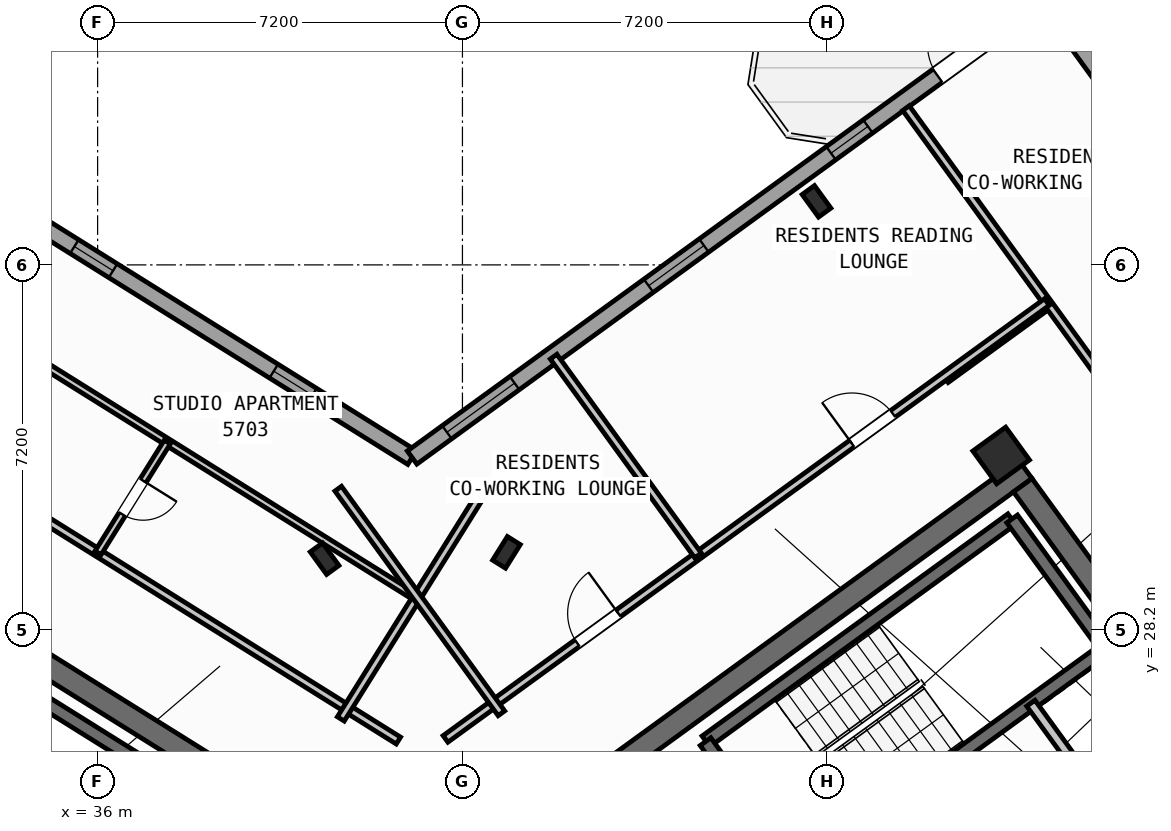
"""IFC4 building model, lengths in metres.
Left out: names, types, materials, properties, quantities, classifications, styles, units other than length and angle.
Written with IfcOpenShell. Run it as: python <this file> out.ifc"""

import sys

from ifc_helpers import new_model, si_unit, direction, frame, frame_2d, origin, origin_2d, place, context, subcontext, project, spatial, rectangle, hollow_rectangle, i_section, extrude, source, transform, mapped, element, fill, save


model = new_model("IFC4")
c1 = context("Model", 3, precision=1e-05, world=origin(), true_north=direction((0.0, 1.0)))
c2 = subcontext(c1, "Body", "Model", "MODEL_VIEW")
j1 = project(units=[si_unit("LENGTHUNIT", "METRE"), si_unit("PLANEANGLEUNIT", "RADIAN")], contexts=[c1])
p1 = place(None, origin())
s1 = spatial("IfcSite", under=j1, at=p1, CompositionType="ELEMENT")
p2 = place(p1, origin())
s2 = spatial("IfcBuilding", under=s1, at=p2, CompositionType="ELEMENT")
p3 = place(p2, frame((0.0, 0.0, 225.6)))
s3 = spatial("IfcBuildingStorey", under=s2, at=p3, CompositionType="ELEMENT", Elevation=225.6)
p4 = place(p3, frame((40.531, 24.036, 0.0), z_axis=(0.0, 0.0, 1.0), x_axis=(-0.848048787466, 0.529918157905, 0.0)))
e1 = element("IfcWall", 1, at=p4, inside=s3, PredefinedType="SHEAR", context=c2, shape_type="SweptSolid", body=[
    extrude(rectangle(XDim=13.04, YDim=0.45, at=frame_2d((6.52, 0.0))), origin(), (0.0, 0.0, 1.0), 3.35),
])
p5 = place(p3, frame((44.406, 24.172, 0.0), z_axis=(0.0, 0.0, 1.0), x_axis=(0.809012867805, 0.587790931986, 0.0)))
e2 = element("IfcWall", 2, at=p5, inside=s3, PredefinedType="SHEAR", context=c2, shape_type="SweptSolid", body=[
    extrude(rectangle(XDim=12.24, YDim=0.45, at=frame_2d((6.12, 0.0))), origin(), (0.0, 0.0, 1.0), 3.35),
])
p6 = place(p3, frame((58.064, 25.813, 0.0), z_axis=(0.0, 0.0, 1.0), x_axis=(-0.587774812919, 0.809024578921, 0.0)))
e3 = element("IfcWall", 3, at=p6, inside=s3, PredefinedType="SHEAR", context=c2, shape_type="SweptSolid", body=[
    extrude(rectangle(XDim=6.475, YDim=0.45, at=frame_2d((3.238, 0.0))), origin(), (0.0, 0.0, 1.0), 3.35),
])
m1 = source(origin(), c2, "Body", "SweptSolid", [
    extrude(i_section(OverallWidth=0.3, OverallDepth=0.55, WebThickness=0.015, FlangeThickness=0.029, at=origin_2d()), origin(), (0.0, 0.0, 1.0), 3.6),
])
for number, where, z_axis, x_axis in (
    (4, (44.068, 29.726, 0.0), (0.0, 0.0, 1.0), (-0.848, 0.53, 0.0)),
    (5, (40.479, 29.601, 0.0), (0.0, 0.0, 1.0), (0.809, 0.588, 0.0)),
):
    element("IfcColumn", number, at=place(p3, frame(where, z_axis=z_axis, x_axis=x_axis)), inside=s3, PredefinedType="COLUMN", context=c2, shape_type="MappedRepresentation", body=[
        mapped(m1, transform((0.0, 0.0, 0.0), scale=1.0)),
    ])
m2 = source(origin(), c2, "Body", "SweptSolid", [
    extrude(hollow_rectangle(XDim=0.8, YDim=0.8, WallThickness=0.032, at=origin_2d()), origin(), (0.0, 0.0, 1.0), 3.6),
])
p7 = place(p3, frame((53.832, 31.638, 0.0), z_axis=(0.0, 0.0, 1.0), x_axis=(0.809016994375, 0.587785252292, 0.0)))
e6 = element("IfcColumn", 6, at=p7, inside=s3, PredefinedType="COLUMN", context=c2, shape_type="MappedRepresentation", body=[
    mapped(m2, transform((0.0, 0.0, 0.0), scale=1.0)),
])
p8 = place(p3, frame((50.188, 36.654, 0.0), z_axis=(0.0, 0.0, 1.0), x_axis=(0.809016994375, 0.587785252292, 0.0)))
e7 = element("IfcColumn", 7, at=p8, inside=s3, PredefinedType="COLUMN", context=c2, shape_type="MappedRepresentation", body=[
    mapped(m1, transform((0.0, 0.0, 0.0), scale=1.0)),
])
p9 = place(p3, frame((17.424, 47.083, 0.0), z_axis=(0.0, 0.0, 1.0), x_axis=(0.848049927979, -0.529916332693, 0.0)))
e8 = element("IfcWall", 8, at=p9, inside=s3, PredefinedType="STANDARD", context=c2, shape_type="SweptSolid", body=[
    extrude(rectangle(XDim=29.223, YDim=0.32, at=frame_2d((14.612, 0.0))), origin(), (0.0, 0.0, 1.0), 3.35),
])
p10 = place(p9, frame((3.709, 0.0, 0.0)))
e9 = element("IfcOpeningElement", 9, at=p10, cuts=e8, PredefinedType="OPENING", context=c2, shape_type="SweptSolid", body=[
    extrude(rectangle(XDim=1.05, YDim=2.15, at=frame_2d((0.525, 1.075))), frame((0.0, 0.17, 0.0), z_axis=(0.0, -1.0, 0.0), x_axis=(1.0, 0.0, 0.0)), (0.0, 0.0, 1.0), 0.34),
])
p11 = place(p9, frame((0.809, 0.0, 1.0)))
e10 = element("IfcOpeningElement", 10, at=p11, cuts=e8, PredefinedType="OPENING", context=c2, shape_type="SweptSolid", body=[
    extrude(rectangle(XDim=0.9, YDim=1.25, at=frame_2d((0.45, 0.625))), frame((0.0, 0.17, 0.0), z_axis=(0.0, -1.0, 0.0), x_axis=(1.0, 0.0, 0.0)), (0.0, 0.0, 1.0), 0.34),
])
p12 = place(p9, frame((13.811, 0.0, 0.9)))
e11 = element("IfcOpeningElement", 11, at=p12, cuts=e8, PredefinedType="OPENING", context=c2, shape_type="SweptSolid", body=[
    extrude(rectangle(XDim=1.35, YDim=1.45, at=frame_2d((0.675, 0.725))), frame((0.0, 0.17, 0.0), z_axis=(0.0, -1.0, 0.0), x_axis=(1.0, 0.0, 0.0)), (0.0, 0.0, 1.0), 0.34),
])
p13 = place(p9, frame((17.254, 0.0, 1.0)))
e12 = element("IfcOpeningElement", 12, at=p13, cuts=e8, PredefinedType="OPENING", context=c2, shape_type="SweptSolid", body=[
    extrude(rectangle(XDim=0.9, YDim=1.25, at=frame_2d((0.45, 0.625))), frame((0.0, 0.17, 0.0), z_axis=(0.0, -1.0, 0.0), x_axis=(1.0, 0.0, 0.0)), (0.0, 0.0, 1.0), 0.34),
])
p14 = place(p9, frame((21.364, 0.0, 1.0)))
e13 = element("IfcOpeningElement", 13, at=p14, cuts=e8, PredefinedType="OPENING", context=c2, shape_type="SweptSolid", body=[
    extrude(rectangle(XDim=0.9, YDim=1.25, at=frame_2d((0.45, 0.625))), frame((0.0, 0.17, 0.0), z_axis=(0.0, -1.0, 0.0), x_axis=(1.0, 0.0, 0.0)), (0.0, 0.0, 1.0), 0.34),
])
p15 = place(p9, frame((26.003, 0.0, 1.0)))
e14 = element("IfcOpeningElement", 14, at=p15, cuts=e8, PredefinedType="OPENING", context=c2, shape_type="SweptSolid", body=[
    extrude(rectangle(XDim=0.9, YDim=1.25, at=frame_2d((0.45, 0.625))), frame((0.0, 0.17, 0.0), z_axis=(0.0, -1.0, 0.0), x_axis=(1.0, 0.0, 0.0)), (0.0, 0.0, 1.0), 0.34),
])
p16 = place(p9, frame((11.211, 0.0, 1.0)))
e15 = element("IfcOpeningElement", 15, at=p16, cuts=e8, PredefinedType="OPENING", context=c2, shape_type="SweptSolid", body=[
    extrude(rectangle(XDim=0.65, YDim=1.15, at=frame_2d((0.325, 0.575))), frame((0.0, 0.17, 0.0), z_axis=(0.0, -1.0, 0.0), x_axis=(1.0, 0.0, 0.0)), (0.0, 0.0, 1.0), 0.34),
])
p17 = place(p9, frame((9.079, 0.0, 1.0)))
e16 = element("IfcOpeningElement", 16, at=p17, cuts=e8, PredefinedType="OPENING", context=c2, shape_type="SweptSolid", body=[
    extrude(rectangle(XDim=0.65, YDim=1.15, at=frame_2d((0.325, 0.575))), frame((0.0, 0.17, 0.0), z_axis=(0.0, -1.0, 0.0), x_axis=(1.0, 0.0, 0.0)), (0.0, 0.0, 1.0), 0.34),
])
p18 = place(p9, frame((6.951, 0.0, 1.0)))
e17 = element("IfcOpeningElement", 17, at=p18, cuts=e8, PredefinedType="OPENING", context=c2, shape_type="SweptSolid", body=[
    extrude(rectangle(XDim=0.65, YDim=1.15, at=frame_2d((0.325, 0.575))), frame((0.0, 0.17, 0.0), z_axis=(0.0, -1.0, 0.0), x_axis=(1.0, 0.0, 0.0)), (0.0, 0.0, 1.0), 0.34),
])
p19 = place(p3, frame((42.207, 31.597, 0.0), z_axis=(0.0, 0.0, 1.0), x_axis=(0.809020333377, 0.587780656523, 0.0)))
e18 = element("IfcWall", 18, at=p19, inside=s3, PredefinedType="STANDARD", context=c2, shape_type="SweptSolid", body=[
    extrude(rectangle(XDim=15.223, YDim=0.32, at=frame_2d((7.611, 0.0))), origin(), (0.0, 0.0, 1.0), 3.35),
])
p20 = place(p19, frame((12.82, 0.0, 0.0)))
e19 = element("IfcOpeningElement", 19, at=p20, cuts=e18, PredefinedType="OPENING", context=c2, shape_type="SweptSolid", body=[
    extrude(rectangle(XDim=1.05, YDim=2.15, at=frame_2d((0.525, 1.075))), frame((0.0, 0.17, 0.0), z_axis=(0.0, -1.0, 0.0), x_axis=(1.0, 0.0, 0.0)), (0.0, 0.0, 1.0), 0.34),
])
p21 = place(p19, frame((0.85, 0.0, 0.9)))
e20 = element("IfcOpeningElement", 20, at=p21, cuts=e18, PredefinedType="OPENING", context=c2, shape_type="SweptSolid", body=[
    extrude(rectangle(XDim=1.65, YDim=1.45, at=frame_2d((0.825, 0.725))), frame((0.0, 0.17, 0.0), z_axis=(0.0, -1.0, 0.0), x_axis=(1.0, 0.0, 0.0)), (0.0, 0.0, 1.0), 0.34),
])
p22 = place(p19, frame((5.769, 0.0, 0.9)))
e21 = element("IfcOpeningElement", 21, at=p22, cuts=e18, PredefinedType="OPENING", context=c2, shape_type="SweptSolid", body=[
    extrude(rectangle(XDim=1.35, YDim=1.45, at=frame_2d((0.675, 0.725))), frame((0.0, 0.17, 0.0), z_axis=(0.0, -1.0, 0.0), x_axis=(1.0, 0.0, 0.0)), (0.0, 0.0, 1.0), 0.34),
])
p23 = place(p19, frame((10.219, 0.0, 1.0)))
e22 = element("IfcOpeningElement", 22, at=p23, cuts=e18, PredefinedType="OPENING", context=c2, shape_type="SweptSolid", body=[
    extrude(rectangle(XDim=0.9, YDim=1.25, at=frame_2d((0.45, 0.625))), frame((0.0, 0.17, 0.0), z_axis=(0.0, -1.0, 0.0), x_axis=(1.0, 0.0, 0.0)), (0.0, 0.0, 1.0), 0.34),
])
p24 = place(p3, frame((54.81, 40.5, 0.0), z_axis=(0.0, 0.0, 1.0), x_axis=(0.587783625747, -0.809018176127, 0.0)))
e23 = element("IfcWall", 23, at=p24, inside=s3, PredefinedType="STANDARD", context=c2, shape_type="SweptSolid", body=[
    extrude(rectangle(XDim=21.587, YDim=0.32, at=frame_2d((10.794, 0.0))), origin(), (0.0, 0.0, 1.0), 2.825),
])
p25 = place(p24, frame((2.593, 0.0, 0.9)))
e24 = element("IfcOpeningElement", 24, at=p25, cuts=e23, PredefinedType="OPENING", context=c2, shape_type="SweptSolid", body=[
    extrude(rectangle(XDim=1.65, YDim=1.45, at=frame_2d((0.825, 0.725))), frame((0.0, 0.17, 0.0), z_axis=(0.0, -1.0, 0.0), x_axis=(1.0, 0.0, 0.0)), (0.0, 0.0, 1.0), 0.34),
])
p26 = place(p24, frame((8.119, 0.0, 0.9)))
e25 = element("IfcOpeningElement", 25, at=p26, cuts=e23, PredefinedType="OPENING", context=c2, shape_type="SweptSolid", body=[
    extrude(rectangle(XDim=1.35, YDim=1.45, at=frame_2d((0.675, 0.725))), frame((0.0, 0.17, 0.0), z_axis=(0.0, -1.0, 0.0), x_axis=(1.0, 0.0, 0.0)), (0.0, 0.0, 1.0), 0.34),
])
p27 = place(p24, frame((11.019, 0.0, 0.9)))
e26 = element("IfcOpeningElement", 26, at=p27, cuts=e23, PredefinedType="OPENING", context=c2, shape_type="SweptSolid", body=[
    extrude(rectangle(XDim=1.35, YDim=1.45, at=frame_2d((0.675, 0.725))), frame((0.0, 0.17, 0.0), z_axis=(0.0, -1.0, 0.0), x_axis=(1.0, 0.0, 0.0)), (0.0, 0.0, 1.0), 0.34),
])
p28 = place(p24, frame((19.259, 0.0, 1.0)))
e27 = element("IfcOpeningElement", 27, at=p28, cuts=e23, PredefinedType="OPENING", context=c2, shape_type="SweptSolid", body=[
    extrude(rectangle(XDim=0.9, YDim=1.25, at=frame_2d((0.45, 0.625))), frame((0.0, 0.17, 0.0), z_axis=(0.0, -1.0, 0.0), x_axis=(1.0, 0.0, 0.0)), (0.0, 0.0, 1.0), 0.34),
])
p29 = place(p3, frame((39.721, 23.788, 0.0), z_axis=(0.0, 0.0, 1.0), x_axis=(-0.848054434086, 0.529909121291, 0.0)))
e28 = element("IfcWall", 28, at=p29, inside=s3, PredefinedType="SHEAR", context=c2, shape_type="SweptSolid", body=[
    extrude(rectangle(XDim=7.33, YDim=0.26, at=frame_2d((3.665, 0.0))), origin(), (0.0, 0.0, 1.0), 3.35),
])
p30 = place(p3, frame((48.006, 25.996, 0.0), z_axis=(0.0, 0.0, 1.0), x_axis=(0.80901903764, 0.587782439969, 0.0)))
e29 = element("IfcWall", 29, at=p30, inside=s3, PredefinedType="SHEAR", context=c2, shape_type="SweptSolid", body=[
    extrude(rectangle(XDim=7.46, YDim=0.26, at=frame_2d((3.73, 0.0))), origin(), (0.0, 0.0, 1.0), 3.35),
])
p31 = place(p3, frame((49.863, 23.44, 0.0), z_axis=(0.0, 0.0, 1.0), x_axis=(0.809003474932, 0.587803859759, 0.0)))
e30 = element("IfcWall", 30, at=p31, inside=s3, PredefinedType="SHEAR", context=c2, shape_type="SweptSolid", body=[
    extrude(rectangle(XDim=7.46, YDim=0.26, at=frame_2d((3.73, 0.0))), origin(), (0.0, 0.0, 1.0), 3.35),
])
p32 = place(p31, frame((0.36, 0.0, 0.0)))
e31 = element("IfcOpeningElement", 31, at=p32, cuts=e30, PredefinedType="OPENING", context=c2, shape_type="SweptSolid", body=[
    extrude(rectangle(XDim=0.86, YDim=2.05, at=frame_2d((0.43, 1.025))), frame((0.0, 0.14, 0.0), z_axis=(0.0, -1.0, 0.0), x_axis=(1.0, 0.0, 0.0)), (0.0, 0.0, 1.0), 0.28),
])
p33 = place(p3, frame((49.855, 23.434, 0.0), z_axis=(0.0, 0.0, 1.0), x_axis=(-0.58776738483, 0.809029975545, 0.0)))
e32 = element("IfcWall", 32, at=p33, inside=s3, PredefinedType="SHEAR", context=c2, shape_type="SweptSolid", body=[
    extrude(rectangle(XDim=3.16, YDim=0.26, at=frame_2d((1.58, 0.0))), origin(), (0.0, 0.0, 1.0), 3.35),
])
p34 = place(p3, frame((55.906, 27.831, 0.0), z_axis=(0.0, 0.0, 1.0), x_axis=(-0.587804123638, 0.809003283204, 0.0)))
e33 = element("IfcWall", 33, at=p34, inside=s3, PredefinedType="SHEAR", context=c2, shape_type="SweptSolid", body=[
    extrude(rectangle(XDim=3.16, YDim=0.26, at=frame_2d((1.58, 0.0))), origin(), (0.0, 0.0, 1.0), 3.35),
])
p35 = place(p3, frame((56.111, 24.419, 0.0), z_axis=(0.0, 0.0, 1.0), x_axis=(-0.58777848983, 0.809021907548, 0.0)))
e34 = element("IfcWall", 34, at=p35, inside=s3, PredefinedType="STANDARD", context=c2, shape_type="SweptSolid", body=[
    extrude(rectangle(XDim=2.88, YDim=0.2, at=frame_2d((1.44, 0.0))), origin(), (0.0, 0.0, 1.0), 3.34),
])
p36 = place(p3, frame((41.936, 26.012, 0.0), z_axis=(0.0, 0.0, 1.0), x_axis=(-0.848051154596, 0.529914369676, 0.0)))
e35 = element("IfcWall", 35, at=p36, inside=s3, PredefinedType="PARTITIONING", context=c2, shape_type="SweptSolid", body=[
    extrude(rectangle(XDim=15.57, YDim=0.16, at=frame_2d((7.785, 0.0))), origin(), (0.0, 0.0, 1.0), 3.34),
])
p37 = place(p36, frame((10.83, 0.0, 0.0)))
e36 = element("IfcOpeningElement", 36, at=p37, cuts=e35, PredefinedType="OPENING", context=c2, shape_type="SweptSolid", body=[
    extrude(rectangle(XDim=1.0, YDim=2.1, at=frame_2d((0.5, 1.05))), frame((0.0, 0.09, 0.0), z_axis=(0.0, -1.0, 0.0), x_axis=(1.0, 0.0, 0.0)), (0.0, 0.0, 1.0), 0.18),
])
p38 = place(p3, frame((43.704, 31.086, 0.0), z_axis=(0.0, 0.0, 1.0), x_axis=(-0.529906828443, -0.848055866774, 0.0)))
e37 = element("IfcWall", 37, at=p38, inside=s3, PredefinedType="PARTITIONING", context=c2, shape_type="SweptSolid", body=[
    extrude(rectangle(XDim=5.48, YDim=0.16, at=frame_2d((2.74, 0.0))), origin(), (0.0, 0.0, 1.0), 3.34),
])
p39 = place(p3, frame((42.226, 28.873, 0.0), z_axis=(0.0, 0.0, 1.0), x_axis=(-0.848049134363, 0.529917602752, 0.0)))
e38 = element("IfcWall", 38, at=p39, inside=s3, PredefinedType="PLUMBINGWALL", context=c2, shape_type="SweptSolid", body=[
    extrude(rectangle(XDim=14.3, YDim=0.14, at=frame_2d((7.15, 0.0))), origin(), (0.0, 0.0, 1.0), 3.34),
])
p40 = place(p39, frame((9.57, 0.0, 0.0)))
e39 = element("IfcOpeningElement", 39, at=p40, cuts=e38, PredefinedType="OPENING", context=c2, shape_type="SweptSolid", body=[
    extrude(rectangle(XDim=0.92, YDim=2.08, at=frame_2d((0.46, 1.04))), frame((0.0, 0.08, 0.0), z_axis=(0.0, -1.0, 0.0), x_axis=(1.0, 0.0, 0.0)), (0.0, 0.0, 1.0), 0.16),
])
p41 = place(p3, frame((37.375, 31.904, 0.0), z_axis=(0.0, 0.0, 1.0), x_axis=(-0.529913878929, -0.848051461244, 0.0)))
e40 = element("IfcWall", 40, at=p41, inside=s3, PredefinedType="PLUMBINGWALL", context=c2, shape_type="SweptSolid", body=[
    extrude(rectangle(XDim=2.58, YDim=0.14, at=frame_2d((1.29, 0.0))), origin(), (0.0, 0.0, 1.0), 3.34),
])
p42 = place(p41, frame((0.9, 0.0, 0.0)))
e41 = element("IfcOpeningElement", 41, at=p42, cuts=e40, PredefinedType="OPENING", context=c2, shape_type="SweptSolid", body=[
    extrude(rectangle(XDim=0.78, YDim=2.05, at=frame_2d((0.39, 1.025))), frame((0.0, 0.08, 0.0), z_axis=(0.0, -1.0, 0.0), x_axis=(1.0, 0.0, 0.0)), (0.0, 0.0, 1.0), 0.16),
])
p43 = place(p3, frame((52.739, 33.143, 0.0), z_axis=(0.0, 0.0, 1.0), x_axis=(0.809000999347, 0.58780726693, 0.0)))
e42 = element("IfcWall", 42, at=p43, inside=s3, PredefinedType="PARTITIONING", context=c2, shape_type="SweptSolid", body=[
    extrude(rectangle(XDim=2.51, YDim=0.16, at=frame_2d((1.255, 0.0))), origin(), (0.0, 0.0, 1.0), 3.34),
])
p44 = place(p3, frame((61.564, 25.266, 0.0), z_axis=(0.0, 0.0, 1.0), x_axis=(-0.587784527444, 0.809017521007, 0.0)))
e43 = element("IfcWall", 43, at=p44, inside=s3, PredefinedType="PARTITIONING", context=c2, shape_type="SweptSolid", body=[
    extrude(rectangle(XDim=16.35, YDim=0.16, at=frame_2d((8.175, 0.0))), origin(), (0.0, 0.0, 1.0), 3.34),
])
p45 = place(p3, frame((42.866, 26.044, 0.0), z_axis=(0.0, 0.0, 1.0), x_axis=(0.809020254154, 0.587780765566, 0.0)))
e44 = element("IfcWall", 44, at=p45, inside=s3, PredefinedType="PARTITIONING", context=c2, shape_type="SweptSolid", body=[
    extrude(rectangle(XDim=14.67, YDim=0.16, at=frame_2d((7.335, 0.0))), origin(), (0.0, 0.0, 1.0), 3.34),
])
p46 = place(p45, frame((3.215, 0.0, 0.0)))
e45 = element("IfcOpeningElement", 45, at=p46, cuts=e44, PredefinedType="OPENING", context=c2, shape_type="SweptSolid", body=[
    extrude(rectangle(XDim=1.0, YDim=2.1, at=frame_2d((0.5, 1.05))), frame((0.0, 0.09, 0.0), z_axis=(0.0, -1.0, 0.0), x_axis=(1.0, 0.0, 0.0)), (0.0, 0.0, 1.0), 0.18),
])
p47 = place(p45, frame((9.915, 0.0, 0.0)))
e46 = element("IfcOpeningElement", 46, at=p47, cuts=e44, PredefinedType="OPENING", context=c2, shape_type="SweptSolid", body=[
    extrude(rectangle(XDim=1.0, YDim=2.1, at=frame_2d((0.5, 1.05))), frame((0.0, 0.09, 0.0), z_axis=(0.0, -1.0, 0.0), x_axis=(1.0, 0.0, 0.0)), (0.0, 0.0, 1.0), 0.18),
])
p48 = place(p3, frame((43.969, 26.55, 0.0), z_axis=(0.0, 0.0, 1.0), x_axis=(-0.587776919386, 0.80902304852, 0.0)))
e47 = element("IfcWall", 47, at=p48, inside=s3, PredefinedType="PARTITIONING", context=c2, shape_type="SweptSolid", body=[
    extrude(rectangle(XDim=5.48, YDim=0.16, at=frame_2d((2.74, 0.0))), origin(), (0.0, 0.0, 1.0), 3.34),
])
p49 = place(p3, frame((47.849, 29.665, 0.0), z_axis=(0.0, 0.0, 1.0), x_axis=(-0.587785532001, 0.809016791155, 0.0)))
e48 = element("IfcWall", 48, at=p49, inside=s3, PredefinedType="PARTITIONING", context=c2, shape_type="SweptSolid", body=[
    extrude(rectangle(XDim=4.85, YDim=0.16, at=frame_2d((2.425, 0.0))), origin(), (0.0, 0.0, 1.0), 3.34),
])
m3 = source(origin(), c2, "Body", "SweptSolid", [
    extrude(rectangle(XDim=1.05, YDim=2.15, at=frame_2d((0.525, 1.075))), frame((0.0, 0.025, 0.0), z_axis=(0.0, -1.0, 0.0), x_axis=(1.0, 0.0, 0.0)), (0.0, 0.0, 1.0), 0.05),
])
p50 = place(p20, origin())
e49 = element("IfcDoor", 49, at=p50, inside=s3, OperationType="SINGLE_SWING_RIGHT", PredefinedType="DOOR", context=c2, shape_type="MappedRepresentation", body=[
    mapped(m3, transform((0.0, 0.0, 0.0), scale=1.0)),
])
fill(e19, e49)
m4 = source(origin(), c2, "Body", "SweptSolid", [
    extrude(rectangle(XDim=0.9, YDim=1.25, at=frame_2d((0.45, 0.625))), frame((0.0, 0.03, 0.0), z_axis=(0.0, -1.0, 0.0), x_axis=(1.0, 0.0, 0.0)), (0.0, 0.0, 1.0), 0.06),
])
p51 = place(p14, origin())
e50 = element("IfcWindow", 50, at=p51, inside=s3, PartitioningType="SINGLE_PANEL", PredefinedType="WINDOW", context=c2, shape_type="MappedRepresentation", body=[
    mapped(m4, transform((0.0, 0.0, 0.0), scale=1.0)),
])
fill(e13, e50)
p52 = place(p15, origin())
e51 = element("IfcWindow", 51, at=p52, inside=s3, PartitioningType="SINGLE_PANEL", PredefinedType="WINDOW", context=c2, shape_type="MappedRepresentation", body=[
    mapped(m4, transform((0.0, 0.0, 0.0), scale=1.0)),
])
fill(e14, e51)
m5 = source(origin(), c2, "Body", "SweptSolid", [
    extrude(rectangle(XDim=1.65, YDim=1.45, at=frame_2d((0.825, 0.725))), frame((0.0, 0.03, 0.0), z_axis=(0.0, -1.0, 0.0), x_axis=(1.0, 0.0, 0.0)), (0.0, 0.0, 1.0), 0.06),
])
p53 = place(p21, origin())
e52 = element("IfcWindow", 52, at=p53, inside=s3, PartitioningType="SINGLE_PANEL", PredefinedType="WINDOW", context=c2, shape_type="MappedRepresentation", body=[
    mapped(m5, transform((0.0, 0.0, 0.0), scale=1.0)),
])
fill(e20, e52)
m6 = source(origin(), c2, "Body", "SweptSolid", [
    extrude(rectangle(XDim=1.35, YDim=1.45, at=frame_2d((0.675, 0.725))), frame((0.0, 0.03, 0.0), z_axis=(0.0, -1.0, 0.0), x_axis=(1.0, 0.0, 0.0)), (0.0, 0.0, 1.0), 0.06),
])
p54 = place(p22, origin())
e53 = element("IfcWindow", 53, at=p54, inside=s3, PartitioningType="SINGLE_PANEL", PredefinedType="WINDOW", context=c2, shape_type="MappedRepresentation", body=[
    mapped(m6, transform((0.0, 0.0, 0.0), scale=1.0)),
])
fill(e21, e53)
p55 = place(p23, origin())
e54 = element("IfcWindow", 54, at=p55, inside=s3, PartitioningType="SINGLE_PANEL", PredefinedType="WINDOW", context=c2, shape_type="MappedRepresentation", body=[
    mapped(m4, transform((0.0, 0.0, 0.0), scale=1.0)),
])
fill(e22, e54)
m7 = source(origin(), c2, "Body", "SweptSolid", [
    extrude(rectangle(XDim=0.78, YDim=2.05, at=frame_2d((0.39, 1.025))), frame((0.0, 0.025, 0.0), z_axis=(0.0, -1.0, 0.0), x_axis=(1.0, 0.0, 0.0)), (0.0, 0.0, 1.0), 0.05),
])
p56 = place(p42, origin())
e55 = element("IfcDoor", 55, at=p56, inside=s3, OperationType="SINGLE_SWING_LEFT", PredefinedType="DOOR", context=c2, shape_type="MappedRepresentation", body=[
    mapped(m7, transform((0.0, 0.0, 0.0), scale=1.0)),
])
fill(e41, e55)
m8 = source(origin(), c2, "Body", "SweptSolid", [
    extrude(rectangle(XDim=1.0, YDim=2.1, at=frame_2d((0.5, 1.05))), frame((0.0, 0.025, 0.0), z_axis=(0.0, -1.0, 0.0), x_axis=(1.0, 0.0, 0.0)), (0.0, 0.0, 1.0), 0.05),
])
p57 = place(p46, origin())
e56 = element("IfcDoor", 56, at=p57, inside=s3, OperationType="SINGLE_SWING_RIGHT", PredefinedType="DOOR", context=c2, shape_type="MappedRepresentation", body=[
    mapped(m8, transform((0.0, 0.0, 0.0), scale=1.0)),
])
fill(e45, e56)
p58 = place(p47, origin())
e57 = element("IfcDoor", 57, at=p58, inside=s3, OperationType="SINGLE_SWING_LEFT", PredefinedType="DOOR", context=c2, shape_type="MappedRepresentation", body=[
    mapped(m8, transform((0.0, 0.0, 0.0), scale=1.0)),
])
fill(e46, e57)
save(model, sys.argv[1])
